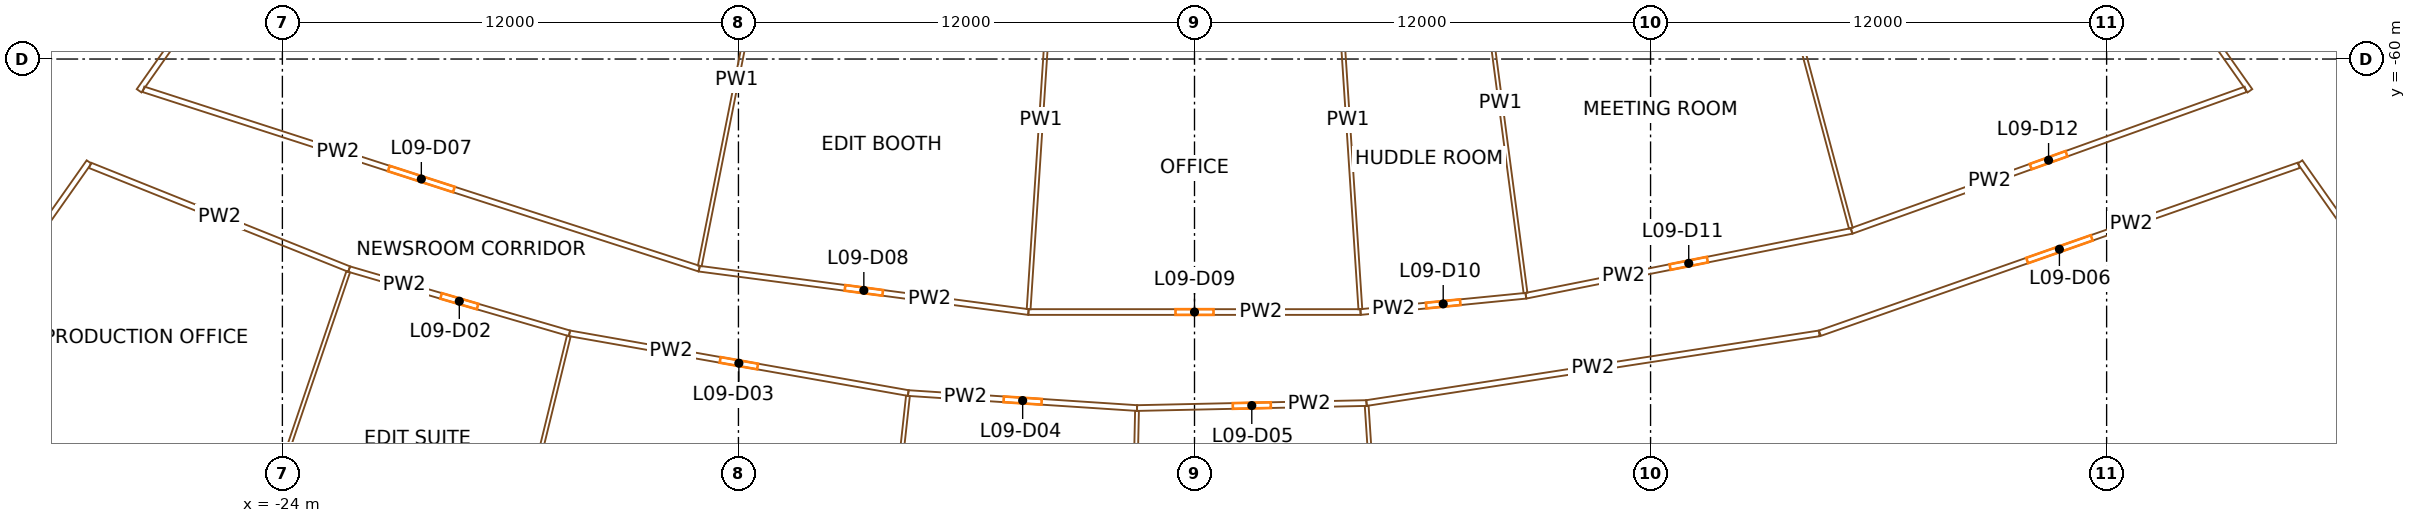
"""IFC4 building model, lengths in metres.
Left out: names, types, materials, properties, quantities, classifications, styles, units other than length and angle.
Written with IfcOpenShell. Run it as: python <this file> out.ifc"""

import sys

from ifc_helpers import new_model, si_unit, direction, frame, frame_2d, origin, place, context, subcontext, project, spatial, rectangle, extrude, element, fill, save


model = new_model("IFC4")
c1 = context("Model", 3, precision=1e-05, world=origin(), true_north=direction((0.0, 1.0)))
c2 = subcontext(c1, "Body", "Model", "MODEL_VIEW")
j1 = project(units=[si_unit("LENGTHUNIT", "METRE"), si_unit("PLANEANGLEUNIT", "RADIAN")], contexts=[c1])
p1 = place(None, origin())
s1 = spatial("IfcSite", under=j1, at=p1, CompositionType="ELEMENT")
p2 = place(p1, origin())
s2 = spatial("IfcBuilding", under=s1, at=p2, CompositionType="ELEMENT")
p3 = place(p2, frame((0.0, 0.0, 51.9)))
s3 = spatial("IfcBuildingStorey", under=s2, at=p3, CompositionType="ELEMENT", Elevation=51.9)
p4 = place(p3, frame((-36.717, -66.337, 0.0), z_axis=(0.0, 0.0, 1.0), x_axis=(0.573577477574, 0.819151315216, 0.0)))
e1 = element("IfcWall", 1, at=p4, inside=s3, PredefinedType="SHEAR", context=c2, shape_type="SweptSolid", body=[
    extrude(rectangle(XDim=14.8, YDim=0.9, at=frame_2d((7.4, 0.0))), origin(), (0.0, 0.0, 1.0), 3.5),
])
p5 = place(p4, frame((6.2, 0.0, 0.0)))
e2 = element("IfcOpeningElement", 2, at=p5, cuts=e1, PredefinedType="OPENING", context=c2, shape_type="SweptSolid", body=[
    extrude(rectangle(XDim=2.4, YDim=2.1, at=frame_2d((1.2, 1.05))), frame((0.0, 0.46, 0.0), z_axis=(0.0, -1.0, 0.0), x_axis=(1.0, 0.0, 0.0)), (0.0, 0.0, 1.0), 0.92),
])
p6 = place(p3, frame((36.717, -66.337, 0.0), z_axis=(0.0, 0.0, 1.0), x_axis=(-0.573577477574, 0.819151315216, 0.0)))
e3 = element("IfcWall", 3, at=p6, inside=s3, PredefinedType="SHEAR", context=c2, shape_type="SweptSolid", body=[
    extrude(rectangle(XDim=14.8, YDim=0.9, at=frame_2d((7.4, 0.0))), origin(), (0.0, 0.0, 1.0), 3.5),
])
p7 = place(p6, frame((6.2, 0.0, 0.0)))
e4 = element("IfcOpeningElement", 4, at=p7, cuts=e3, PredefinedType="OPENING", context=c2, shape_type="SweptSolid", body=[
    extrude(rectangle(XDim=2.4, YDim=2.1, at=frame_2d((1.2, 1.05))), frame((0.0, 0.46, 0.0), z_axis=(0.0, -1.0, 0.0), x_axis=(1.0, 0.0, 0.0)), (0.0, 0.0, 1.0), 0.92),
])
p8 = place(p3, frame((-29.088, -62.708, 0.0), z_axis=(0.0, 0.0, 1.0), x_axis=(-0.575411972256, -0.817863718589, 0.0)))
e5 = element("IfcWall", 5, at=p8, inside=s3, PredefinedType="PARTITIONING", context=c2, shape_type="SweptSolid", body=[
    extrude(rectangle(XDim=10.471, YDim=0.15, at=frame_2d((5.236, 0.0))), origin(), (0.0, 0.0, 1.0), 2.4),
])
p9 = place(p8, frame((4.736, 0.0, 0.0)))
e6 = element("IfcOpeningElement", 6, at=p9, cuts=e5, PredefinedType="OPENING", context=c2, shape_type="SweptSolid", body=[
    extrude(rectangle(XDim=1.0, YDim=2.1, at=frame_2d((0.5, 1.05))), frame((0.0, 0.085, 0.0), z_axis=(0.0, -1.0, 0.0), x_axis=(1.0, 0.0, 0.0)), (0.0, 0.0, 1.0), 0.17),
])
p10 = place(p3, frame((-29.061, -62.798, 0.0), z_axis=(0.0, 0.0, 1.0), x_axis=(0.928339065762, -0.371734554462, 0.0)))
e7 = element("IfcWall", 7, at=p10, inside=s3, PredefinedType="PARTITIONING", context=c2, shape_type="SweptSolid", body=[
    extrude(rectangle(XDim=7.344, YDim=0.15, at=frame_2d((3.672, 0.0))), origin(), (0.0, 0.0, 1.0), 2.4),
])
p11 = place(p3, frame((-27.656, -60.797, 0.0), z_axis=(0.0, 0.0, 1.0), x_axis=(0.951666530015, -0.307133221338, 0.0)))
e8 = element("IfcWall", 8, at=p11, inside=s3, PredefinedType="PARTITIONING", context=c2, shape_type="SweptSolid", body=[
    extrude(rectangle(XDim=15.366, YDim=0.15, at=frame_2d((7.683, 0.0))), origin(), (0.0, 0.0, 1.0), 2.4),
])
p12 = place(p11, frame((6.783, 0.0, 0.0)))
e9 = element("IfcOpeningElement", 9, at=p12, cuts=e8, PredefinedType="OPENING", context=c2, shape_type="SweptSolid", body=[
    extrude(rectangle(XDim=1.8, YDim=2.1, at=frame_2d((0.9, 1.05))), frame((0.0, 0.085, 0.0), z_axis=(0.0, -1.0, 0.0), x_axis=(1.0, 0.0, 0.0)), (0.0, 0.0, 1.0), 0.17),
])
p13 = place(p3, frame((-25.538, -75.234, 0.0), z_axis=(0.0, 0.0, 1.0), x_axis=(0.32142736677, 0.946934236308, 0.0)))
e10 = element("IfcWall", 10, at=p13, inside=s3, PredefinedType="PARTITIONING", context=c2, shape_type="SweptSolid", body=[
    extrude(rectangle(XDim=10.175, YDim=0.1, at=frame_2d((5.087, 0.0))), origin(), (0.0, 0.0, 1.0), 2.4),
])
p14 = place(p3, frame((-16.446, -67.217, 0.0), z_axis=(0.0, 0.0, 1.0), x_axis=(-0.960056580345, 0.279805937279, 0.0)))
e11 = element("IfcWall", 11, at=p14, inside=s3, PredefinedType="PARTITIONING", context=c2, shape_type="SweptSolid", body=[
    extrude(rectangle(XDim=6.039, YDim=0.15, at=frame_2d((3.02, 0.0))), origin(), (0.0, 0.0, 1.0), 2.4),
])
p15 = place(p14, frame((2.52, 0.0, 0.0)))
e12 = element("IfcOpeningElement", 12, at=p15, cuts=e11, PredefinedType="OPENING", context=c2, shape_type="SweptSolid", body=[
    extrude(rectangle(XDim=1.0, YDim=2.1, at=frame_2d((0.5, 1.05))), frame((0.0, 0.085, 0.0), z_axis=(0.0, -1.0, 0.0), x_axis=(1.0, 0.0, 0.0)), (0.0, 0.0, 1.0), 0.17),
])
p16 = place(p3, frame((-21.748, -52.276, 0.0), z_axis=(0.0, 0.0, 1.0), x_axis=(-0.575419434668, -0.817858468322, 0.0)))
e13 = element("IfcWall", 13, at=p16, inside=s3, PredefinedType="PARTITIONING", context=c2, shape_type="SweptSolid", body=[
    extrude(rectangle(XDim=10.465, YDim=0.15, at=frame_2d((5.232, 0.0))), origin(), (0.0, 0.0, 1.0), 2.4),
])
p17 = place(p3, frame((-18.846, -77.026, 0.0), z_axis=(0.0, 0.0, 1.0), x_axis=(0.237655344985, 0.971349544191, 0.0)))
e14 = element("IfcWall", 14, at=p17, inside=s3, PredefinedType="PARTITIONING", context=c2, shape_type="SweptSolid", body=[
    extrude(rectangle(XDim=10.023, YDim=0.1, at=frame_2d((5.012, 0.0))), origin(), (0.0, 0.0, 1.0), 2.4),
])
p18 = place(p3, frame((-7.532, -68.789, 0.0), z_axis=(0.0, 0.0, 1.0), x_axis=(-0.984813412134, 0.173616080133, 0.0)))
e15 = element("IfcWall", 15, at=p18, inside=s3, PredefinedType="PARTITIONING", context=c2, shape_type="SweptSolid", body=[
    extrude(rectangle(XDim=9.052, YDim=0.15, at=frame_2d((4.526, 0.0))), origin(), (0.0, 0.0, 1.0), 2.4),
])
p19 = place(p18, frame((4.026, 0.0, 0.0)))
e16 = element("IfcOpeningElement", 16, at=p19, cuts=e15, PredefinedType="OPENING", context=c2, shape_type="SweptSolid", body=[
    extrude(rectangle(XDim=1.0, YDim=2.1, at=frame_2d((0.5, 1.05))), frame((0.0, 0.085, 0.0), z_axis=(0.0, -1.0, 0.0), x_axis=(1.0, 0.0, 0.0)), (0.0, 0.0, 1.0), 0.17),
])
p20 = place(p3, frame((-13.032, -65.516, 0.0), z_axis=(0.0, 0.0, 1.0), x_axis=(0.991443260322, -0.130538352841, 0.0)))
e17 = element("IfcWall", 17, at=p20, inside=s3, PredefinedType="PARTITIONING", context=c2, shape_type="SweptSolid", body=[
    extrude(rectangle(XDim=8.738, YDim=0.15, at=frame_2d((4.369, 0.0))), origin(), (0.0, 0.0, 1.0), 2.4),
])
p21 = place(p20, frame((3.869, 0.0, 0.0)))
e18 = element("IfcOpeningElement", 18, at=p21, cuts=e17, PredefinedType="OPENING", context=c2, shape_type="SweptSolid", body=[
    extrude(rectangle(XDim=1.0, YDim=2.1, at=frame_2d((0.5, 1.05))), frame((0.0, 0.085, 0.0), z_axis=(0.0, -1.0, 0.0), x_axis=(1.0, 0.0, 0.0)), (0.0, 0.0, 1.0), 0.17),
])
p22 = place(p3, frame((-11.071, -55.66, 0.0), z_axis=(0.0, 0.0, 1.0), x_axis=(-0.195094645032, -0.980784420492, 0.0)))
e19 = element("IfcWall", 19, at=p22, inside=s3, PredefinedType="PARTITIONING", context=c2, shape_type="SweptSolid", body=[
    extrude(rectangle(XDim=9.975, YDim=0.1, at=frame_2d((4.987, 0.0))), origin(), (0.0, 0.0, 1.0), 2.4),
])
p23 = place(p3, frame((-8.631, -78.827, 0.0), z_axis=(0.0, 0.0, 1.0), x_axis=(0.108851448718, 0.994058027538, 0.0)))
e20 = element("IfcWall", 20, at=p23, inside=s3, PredefinedType="PARTITIONING", context=c2, shape_type="SweptSolid", body=[
    extrude(rectangle(XDim=10.023, YDim=0.1, at=frame_2d((5.012, 0.0))), origin(), (0.0, 0.0, 1.0), 2.4),
])
p24 = place(p3, frame((-1.511, -69.184, 0.0), z_axis=(0.0, 0.0, 1.0), x_axis=(-0.997856905736, 0.065433903101, 0.0)))
e21 = element("IfcWall", 21, at=p24, inside=s3, PredefinedType="PARTITIONING", context=c2, shape_type="SweptSolid", body=[
    extrude(rectangle(XDim=6.033, YDim=0.15, at=frame_2d((3.017, 0.0))), origin(), (0.0, 0.0, 1.0), 2.4),
])
p25 = place(p24, frame((2.517, 0.0, 0.0)))
e22 = element("IfcOpeningElement", 22, at=p25, cuts=e21, PredefinedType="OPENING", context=c2, shape_type="SweptSolid", body=[
    extrude(rectangle(XDim=1.0, YDim=2.1, at=frame_2d((0.5, 1.05))), frame((0.0, 0.085, 0.0), z_axis=(0.0, -1.0, 0.0), x_axis=(1.0, 0.0, 0.0)), (0.0, 0.0, 1.0), 0.17),
])
p26 = place(p3, frame((-4.369, -66.657, 0.0), z_axis=(0.0, 0.0, 1.0), x_axis=(1.0, 0.0, 0.0)))
e23 = element("IfcWall", 23, at=p26, inside=s3, PredefinedType="PARTITIONING", context=c2, shape_type="SweptSolid", body=[
    extrude(rectangle(XDim=8.738, YDim=0.15, at=frame_2d((4.369, 0.0))), origin(), (0.0, 0.0, 1.0), 2.4),
])
p27 = place(p26, frame((3.869, 0.0, 0.0)))
e24 = element("IfcOpeningElement", 24, at=p27, cuts=e23, PredefinedType="OPENING", context=c2, shape_type="SweptSolid", body=[
    extrude(rectangle(XDim=1.0, YDim=2.1, at=frame_2d((0.5, 1.05))), frame((0.0, 0.085, 0.0), z_axis=(0.0, -1.0, 0.0), x_axis=(1.0, 0.0, 0.0)), (0.0, 0.0, 1.0), 0.17),
])
p28 = place(p3, frame((-3.712, -56.628, 0.0), z_axis=(0.0, 0.0, 1.0), x_axis=(-0.06539808502, -0.997859253841, 0.0)))
e25 = element("IfcWall", 25, at=p28, inside=s3, PredefinedType="PARTITIONING", context=c2, shape_type="SweptSolid", body=[
    extrude(rectangle(XDim=9.975, YDim=0.1, at=frame_2d((4.987, 0.0))), origin(), (0.0, 0.0, 1.0), 2.4),
])
p29 = place(p3, frame((-1.732, -79.28, 0.0), z_axis=(0.0, 0.0, 1.0), x_axis=(0.021848313685, 0.999761297105, 0.0)))
e26 = element("IfcWall", 26, at=p29, inside=s3, PredefinedType="PARTITIONING", context=c2, shape_type="SweptSolid", body=[
    extrude(rectangle(XDim=10.023, YDim=0.1, at=frame_2d((5.012, 0.0))), origin(), (0.0, 0.0, 1.0), 2.4),
])
p30 = place(p3, frame((4.526, -69.052, 0.0), z_axis=(0.0, 0.0, 1.0), x_axis=(-0.999761664283, -0.021831505468, 0.0)))
e27 = element("IfcWall", 27, at=p30, inside=s3, PredefinedType="PARTITIONING", context=c2, shape_type="SweptSolid", body=[
    extrude(rectangle(XDim=6.039, YDim=0.15, at=frame_2d((3.02, 0.0))), origin(), (0.0, 0.0, 1.0), 2.4),
])
p31 = place(p30, frame((2.52, 0.0, 0.0)))
e28 = element("IfcOpeningElement", 28, at=p31, cuts=e27, PredefinedType="OPENING", context=c2, shape_type="SweptSolid", body=[
    extrude(rectangle(XDim=1.0, YDim=2.1, at=frame_2d((0.5, 1.05))), frame((0.0, 0.085, 0.0), z_axis=(0.0, -1.0, 0.0), x_axis=(1.0, 0.0, 0.0)), (0.0, 0.0, 1.0), 0.17),
])
p32 = place(p3, frame((3.712, -56.628, 0.0), z_axis=(0.0, 0.0, 1.0), x_axis=(0.06539808502, -0.997859253841, 0.0)))
e29 = element("IfcWall", 29, at=p32, inside=s3, PredefinedType="PARTITIONING", context=c2, shape_type="SweptSolid", body=[
    extrude(rectangle(XDim=9.975, YDim=0.1, at=frame_2d((4.987, 0.0))), origin(), (0.0, 0.0, 1.0), 2.4),
])
p33 = place(p3, frame((4.369, -66.657, 0.0), z_axis=(0.0, 0.0, 1.0), x_axis=(0.995184826457, 0.098016127192, 0.0)))
e30 = element("IfcWall", 30, at=p33, inside=s3, PredefinedType="PARTITIONING", context=c2, shape_type="SweptSolid", body=[
    extrude(rectangle(XDim=4.371, YDim=0.15, at=frame_2d((2.186, 0.0))), origin(), (0.0, 0.0, 1.0), 2.4),
])
p34 = place(p33, frame((1.736, 0.0, 0.0)))
e31 = element("IfcOpeningElement", 31, at=p34, cuts=e30, PredefinedType="OPENING", context=c2, shape_type="SweptSolid", body=[
    extrude(rectangle(XDim=0.9, YDim=2.1, at=frame_2d((0.45, 1.05))), frame((0.0, 0.085, 0.0), z_axis=(0.0, -1.0, 0.0), x_axis=(1.0, 0.0, 0.0)), (0.0, 0.0, 1.0), 0.17),
])
p35 = place(p3, frame((4.526, -69.052, 0.0), z_axis=(0.0, 0.0, 1.0), x_axis=(0.988363732991, 0.152108945522, 0.0)))
e32 = element("IfcWall", 32, at=p35, inside=s3, PredefinedType="PARTITIONING", context=c2, shape_type="SweptSolid", body=[
    extrude(rectangle(XDim=12.051, YDim=0.15, at=frame_2d((6.025, 0.0))), origin(), (0.0, 0.0, 1.0), 2.4),
])
p36 = place(p3, frame((5.196, -79.28, 0.0), z_axis=(0.0, 0.0, 1.0), x_axis=(-0.065408959123, 0.99785854111, 0.0)))
e33 = element("IfcWall", 33, at=p36, inside=s3, PredefinedType="PARTITIONING", context=c2, shape_type="SweptSolid", body=[
    extrude(rectangle(XDim=10.175, YDim=0.1, at=frame_2d((5.087, 0.0))), origin(), (0.0, 0.0, 1.0), 2.4),
])
p37 = place(p3, frame((7.392, -56.145, 0.0), z_axis=(0.0, 0.0, 1.0), x_axis=(0.130538336764, -0.991443262439, 0.0)))
e34 = element("IfcWall", 34, at=p37, inside=s3, PredefinedType="PARTITIONING", context=c2, shape_type="SweptSolid", body=[
    extrude(rectangle(XDim=10.096, YDim=0.1, at=frame_2d((5.048, 0.0))), origin(), (0.0, 0.0, 1.0), 2.4),
])
p38 = place(p3, frame((8.719, -66.229, 0.0), z_axis=(0.0, 0.0, 1.0), x_axis=(0.980786466832, 0.195084357342, 0.0)))
e35 = element("IfcWall", 35, at=p38, inside=s3, PredefinedType="PARTITIONING", context=c2, shape_type="SweptSolid", body=[
    extrude(rectangle(XDim=8.738, YDim=0.15, at=frame_2d((4.369, 0.0))), origin(), (0.0, 0.0, 1.0), 2.4),
])
p39 = place(p38, frame((3.869, 0.0, 0.0)))
e36 = element("IfcOpeningElement", 36, at=p39, cuts=e35, PredefinedType="OPENING", context=c2, shape_type="SweptSolid", body=[
    extrude(rectangle(XDim=1.0, YDim=2.1, at=frame_2d((0.5, 1.05))), frame((0.0, 0.085, 0.0), z_axis=(0.0, -1.0, 0.0), x_axis=(1.0, 0.0, 0.0)), (0.0, 0.0, 1.0), 0.17),
])
p40 = place(p3, frame((14.657, -54.7, 0.0), z_axis=(0.0, 0.0, 1.0), x_axis=(0.258825935876, -0.965923979885, 0.0)))
e37 = element("IfcWall", 37, at=p40, inside=s3, PredefinedType="PARTITIONING", context=c2, shape_type="SweptSolid", body=[
    extrude(rectangle(XDim=10.096, YDim=0.1, at=frame_2d((5.048, 0.0))), origin(), (0.0, 0.0, 1.0), 2.4),
])
p41 = place(p3, frame((29.06, -62.794, 0.0), z_axis=(0.0, 0.0, 1.0), x_axis=(-0.943672989474, -0.330879568631, 0.0)))
e38 = element("IfcWall", 38, at=p41, inside=s3, PredefinedType="PARTITIONING", context=c2, shape_type="SweptSolid", body=[
    extrude(rectangle(XDim=13.357, YDim=0.15, at=frame_2d((6.679, 0.0))), origin(), (0.0, 0.0, 1.0), 2.4),
])
p42 = place(p41, frame((5.779, 0.0, 0.0)))
e39 = element("IfcOpeningElement", 39, at=p42, cuts=e38, PredefinedType="OPENING", context=c2, shape_type="SweptSolid", body=[
    extrude(rectangle(XDim=1.8, YDim=2.1, at=frame_2d((0.9, 1.05))), frame((0.0, 0.085, 0.0), z_axis=(0.0, -1.0, 0.0), x_axis=(1.0, 0.0, 0.0)), (0.0, 0.0, 1.0), 0.17),
])
p43 = place(p3, frame((17.289, -64.524, 0.0), z_axis=(0.0, 0.0, 1.0), x_axis=(0.941106453562, 0.338110400705, 0.0)))
e40 = element("IfcWall", 40, at=p43, inside=s3, PredefinedType="PARTITIONING", context=c2, shape_type="SweptSolid", body=[
    extrude(rectangle(XDim=11.016, YDim=0.15, at=frame_2d((5.508, 0.0))), origin(), (0.0, 0.0, 1.0), 2.4),
])
p44 = place(p43, frame((5.008, 0.0, 0.0)))
e41 = element("IfcOpeningElement", 41, at=p44, cuts=e40, PredefinedType="OPENING", context=c2, shape_type="SweptSolid", body=[
    extrude(rectangle(XDim=1.0, YDim=2.1, at=frame_2d((0.5, 1.05))), frame((0.0, 0.085, 0.0), z_axis=(0.0, -1.0, 0.0), x_axis=(1.0, 0.0, 0.0)), (0.0, 0.0, 1.0), 0.17),
])
p45 = place(p3, frame((21.748, -52.276, 0.0), z_axis=(0.0, 0.0, 1.0), x_axis=(0.575419434668, -0.817858468322, 0.0)))
e42 = element("IfcWall", 42, at=p45, inside=s3, PredefinedType="PARTITIONING", context=c2, shape_type="SweptSolid", body=[
    extrude(rectangle(XDim=10.465, YDim=0.15, at=frame_2d((5.232, 0.0))), origin(), (0.0, 0.0, 1.0), 2.4),
])
p46 = place(p3, frame((29.088, -62.708, 0.0), z_axis=(0.0, 0.0, 1.0), x_axis=(0.575411972256, -0.817863718589, 0.0)))
e43 = element("IfcWall", 43, at=p46, inside=s3, PredefinedType="PARTITIONING", context=c2, shape_type="SweptSolid", body=[
    extrude(rectangle(XDim=10.471, YDim=0.15, at=frame_2d((5.236, 0.0))), origin(), (0.0, 0.0, 1.0), 2.4),
])
p47 = place(p15, origin())
e44 = element("IfcDoor", 44, at=p47, inside=s3, OperationType="SINGLE_SWING_RIGHT", PredefinedType="DOOR", context=c2, shape_type="SweptSolid", body=[
    extrude(rectangle(XDim=1.0, YDim=2.1, at=frame_2d((0.5, 1.05))), frame((0.0, 0.025, 0.0), z_axis=(0.0, -1.0, 0.0), x_axis=(1.0, 0.0, 0.0)), (0.0, 0.0, 1.0), 0.05),
])
fill(e12, e44)
p48 = place(p19, origin())
e45 = element("IfcDoor", 45, at=p48, inside=s3, OperationType="SINGLE_SWING_RIGHT", PredefinedType="DOOR", context=c2, shape_type="SweptSolid", body=[
    extrude(rectangle(XDim=1.0, YDim=2.1, at=frame_2d((0.5, 1.05))), frame((0.0, 0.025, 0.0), z_axis=(0.0, -1.0, 0.0), x_axis=(1.0, 0.0, 0.0)), (0.0, 0.0, 1.0), 0.05),
])
fill(e16, e45)
p49 = place(p25, origin())
e46 = element("IfcDoor", 46, at=p49, inside=s3, OperationType="SINGLE_SWING_RIGHT", PredefinedType="DOOR", context=c2, shape_type="SweptSolid", body=[
    extrude(rectangle(XDim=1.0, YDim=2.1, at=frame_2d((0.5, 1.05))), frame((0.0, 0.025, 0.0), z_axis=(0.0, -1.0, 0.0), x_axis=(1.0, 0.0, 0.0)), (0.0, 0.0, 1.0), 0.05),
])
fill(e22, e46)
p50 = place(p31, origin())
e47 = element("IfcDoor", 47, at=p50, inside=s3, OperationType="SINGLE_SWING_RIGHT", PredefinedType="DOOR", context=c2, shape_type="SweptSolid", body=[
    extrude(rectangle(XDim=1.0, YDim=2.1, at=frame_2d((0.5, 1.05))), frame((0.0, 0.025, 0.0), z_axis=(0.0, -1.0, 0.0), x_axis=(1.0, 0.0, 0.0)), (0.0, 0.0, 1.0), 0.05),
])
fill(e28, e47)
p51 = place(p42, origin())
e48 = element("IfcDoor", 48, at=p51, inside=s3, OperationType="DOUBLE_DOOR_SINGLE_SWING", PredefinedType="DOOR", context=c2, shape_type="SweptSolid", body=[
    extrude(rectangle(XDim=1.8, YDim=2.1, at=frame_2d((0.9, 1.05))), frame((0.0, 0.025, 0.0), z_axis=(0.0, -1.0, 0.0), x_axis=(1.0, 0.0, 0.0)), (0.0, 0.0, 1.0), 0.05),
])
fill(e39, e48)
p52 = place(p12, origin())
e49 = element("IfcDoor", 49, at=p52, inside=s3, OperationType="DOUBLE_DOOR_SINGLE_SWING", PredefinedType="DOOR", context=c2, shape_type="SweptSolid", body=[
    extrude(rectangle(XDim=1.8, YDim=2.1, at=frame_2d((0.9, 1.05))), frame((0.0, 0.025, 0.0), z_axis=(0.0, -1.0, 0.0), x_axis=(1.0, 0.0, 0.0)), (0.0, 0.0, 1.0), 0.05),
])
fill(e9, e49)
p53 = place(p21, origin())
e50 = element("IfcDoor", 50, at=p53, inside=s3, OperationType="SINGLE_SWING_RIGHT", PredefinedType="DOOR", context=c2, shape_type="SweptSolid", body=[
    extrude(rectangle(XDim=1.0, YDim=2.1, at=frame_2d((0.5, 1.05))), frame((0.0, 0.025, 0.0), z_axis=(0.0, -1.0, 0.0), x_axis=(1.0, 0.0, 0.0)), (0.0, 0.0, 1.0), 0.05),
])
fill(e18, e50)
p54 = place(p27, origin())
e51 = element("IfcDoor", 51, at=p54, inside=s3, OperationType="SINGLE_SWING_RIGHT", PredefinedType="DOOR", context=c2, shape_type="SweptSolid", body=[
    extrude(rectangle(XDim=1.0, YDim=2.1, at=frame_2d((0.5, 1.05))), frame((0.0, 0.025, 0.0), z_axis=(0.0, -1.0, 0.0), x_axis=(1.0, 0.0, 0.0)), (0.0, 0.0, 1.0), 0.05),
])
fill(e24, e51)
p55 = place(p34, origin())
e52 = element("IfcDoor", 52, at=p55, inside=s3, OperationType="SINGLE_SWING_RIGHT", PredefinedType="DOOR", context=c2, shape_type="SweptSolid", body=[
    extrude(rectangle(XDim=0.9, YDim=2.1, at=frame_2d((0.45, 1.05))), frame((0.0, 0.025, 0.0), z_axis=(0.0, -1.0, 0.0), x_axis=(1.0, 0.0, 0.0)), (0.0, 0.0, 1.0), 0.05),
])
fill(e31, e52)
p56 = place(p39, origin())
e53 = element("IfcDoor", 53, at=p56, inside=s3, OperationType="SINGLE_SWING_RIGHT", PredefinedType="DOOR", context=c2, shape_type="SweptSolid", body=[
    extrude(rectangle(XDim=1.0, YDim=2.1, at=frame_2d((0.5, 1.05))), frame((0.0, 0.025, 0.0), z_axis=(0.0, -1.0, 0.0), x_axis=(1.0, 0.0, 0.0)), (0.0, 0.0, 1.0), 0.05),
])
fill(e36, e53)
p57 = place(p44, origin())
e54 = element("IfcDoor", 54, at=p57, inside=s3, OperationType="SINGLE_SWING_RIGHT", PredefinedType="DOOR", context=c2, shape_type="SweptSolid", body=[
    extrude(rectangle(XDim=1.0, YDim=2.1, at=frame_2d((0.5, 1.05))), frame((0.0, 0.025, 0.0), z_axis=(0.0, -1.0, 0.0), x_axis=(1.0, 0.0, 0.0)), (0.0, 0.0, 1.0), 0.05),
])
fill(e41, e54)
save(model, sys.argv[1])
